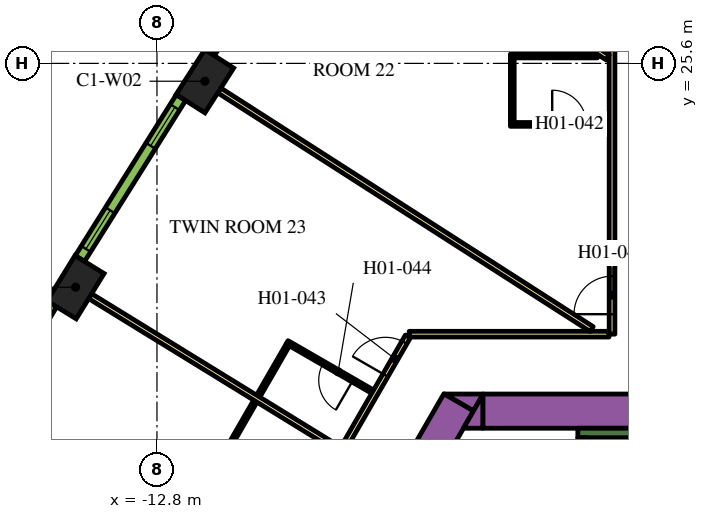
"""IFC4 building model, lengths in metres.
Left out: names, types, materials, properties, quantities, classifications, styles, units other than length and angle.
Written with IfcOpenShell. Run it as: python <this file> out.ifc"""

import sys

from ifc_helpers import new_model, si_unit, direction, frame, frame_2d, origin, origin_2d, place, context, subcontext, project, spatial, polyline, rectangle, outline, extrude, element, fill, save


model = new_model("IFC4")
c1 = context("Model", 3, precision=1e-05, world=origin(), true_north=direction((0.0, 1.0)))
c2 = subcontext(c1, "Body", "Model", "MODEL_VIEW")
j1 = project(units=[si_unit("LENGTHUNIT", "METRE"), si_unit("PLANEANGLEUNIT", "RADIAN")], contexts=[c1])
p1 = place(None, origin())
s1 = spatial("IfcSite", under=j1, at=p1, CompositionType="ELEMENT")
p2 = place(p1, origin())
s2 = spatial("IfcBuilding", under=s1, at=p2, CompositionType="ELEMENT")
p3 = place(p2, frame((0.0, 0.0, 27.6)))
s3 = spatial("IfcBuildingStorey", under=s2, at=p3, CompositionType="ELEMENT", Elevation=27.6)
for number, where, z_axis, x_axis in (
    (1, (-11.539, 25.131, 0.0), (0.0, 0.0, 1.0), (-0.539, -0.842, 0.0)),
    (2, (-14.942, 19.71, 0.0), (0.0, 0.0, 1.0), (-0.524, -0.852, 0.0)),
):
    element("IfcColumn", number, at=place(p3, frame(where, z_axis=z_axis, x_axis=x_axis)), inside=s3, PredefinedType="COLUMN", context=c2, shape_type="SweptSolid", body=[
        extrude(rectangle(XDim=1.4, YDim=0.9, at=origin_2d()), origin(), (0.0, 0.0, 1.0), 3.9),
    ])
p4 = place(p3, frame((-15.36, -1.503, 0.0), z_axis=(0.0, 0.0, 1.0), x_axis=(0.50000389221, 0.866023156604, 0.0)))
e3 = element("IfcWall", 3, at=p4, inside=s3, PredefinedType="SOLIDWALL", context=c2, shape_type="SweptSolid", body=[
    extrude(rectangle(XDim=21.0, YDim=0.9, at=frame_2d((10.5, 0.0))), origin(), (0.0, 0.0, 1.0), 3.9),
])
p5 = place(p3, origin())
e4 = element("IfcWall", 4, at=p5, inside=s3, PredefinedType="SOLIDWALL", context=c2, shape_type="SweptSolid", body=[
    extrude(outline(polyline([(-4.215, 16.9), (-4.469, 16.46), (-5.231, 16.9), (-4.215, 16.9)])), origin(), (0.0, 0.0, 1.0), 3.9),
])
p6 = place(p3, frame((-4.224, 16.45, 0.0), z_axis=(0.0, 0.0, 1.0), x_axis=(1.0, 0.0, 0.0)))
e5 = element("IfcWall", 5, at=p6, inside=s3, PredefinedType="SOLIDWALL", context=c2, shape_type="SweptSolid", body=[
    extrude(rectangle(XDim=9.488, YDim=0.9, at=frame_2d((4.744, 0.0))), origin(), (0.0, 0.0, 1.0), 3.9),
])
e6 = element("IfcWall", 6, at=p5, inside=s3, PredefinedType="SOLIDWALL", context=c2, shape_type="SweptSolid", body=[
    extrude(outline(polyline([(-4.734, 16.0), (-4.226, 16.88), (-4.226, 16.0), (-4.734, 16.0)])), origin(), (0.0, 0.0, 1.0), 3.9),
])
p7 = place(p3, frame((-1.725, 15.875, 0.0), z_axis=(0.0, 0.0, 1.0), x_axis=(1.0, 0.0, 0.0)))
e7 = element("IfcWall", 7, at=p7, inside=s3, PredefinedType="SOLIDWALL", context=c2, shape_type="SweptSolid", body=[
    extrude(rectangle(XDim=3.45, YDim=0.25, at=frame_2d((1.725, 0.0))), origin(), (0.0, 0.0, 1.0), 3.9),
])
p8 = place(p3, frame((-1.6, 8.7, 0.0), z_axis=(0.0, 0.0, 1.0), x_axis=(0.0, 1.0, 0.0)))
e8 = element("IfcWall", 8, at=p8, inside=s3, PredefinedType="SOLIDWALL", context=c2, shape_type="SweptSolid", body=[
    extrude(rectangle(XDim=7.05, YDim=0.25, at=frame_2d((3.525, 0.0))), origin(), (0.0, 0.0, 1.0), 3.9),
])
p9 = place(p3, frame((-0.825, 18.475, 0.0), z_axis=(0.0, 0.0, 1.0), x_axis=(0.0, 1.0, 0.0)))
e9 = element("IfcWall", 9, at=p9, inside=s3, PredefinedType="PARTITIONING", context=c2, shape_type="SweptSolid", body=[
    extrude(rectangle(XDim=16.224, YDim=0.15, at=frame_2d((8.112, 0.0))), origin(), (0.0, 0.0, 1.0), 2.75),
])
p10 = place(p9, frame((7.949, 0.0, 0.0)))
e10 = element("IfcOpeningElement", 10, at=p10, cuts=e9, PredefinedType="OPENING", context=c2, shape_type="SweptSolid", body=[
    extrude(rectangle(XDim=1.0, YDim=2.1, at=frame_2d((0.5, 1.05))), frame((0.0, 0.085, 0.0), z_axis=(0.0, -1.0, 0.0), x_axis=(1.0, 0.0, 0.0)), (0.0, 0.0, 1.0), 0.17),
])
p11 = place(p9, frame((0.526, 0.0, 0.0)))
e11 = element("IfcOpeningElement", 11, at=p11, cuts=e9, PredefinedType="OPENING", context=c2, shape_type="SweptSolid", body=[
    extrude(rectangle(XDim=1.0, YDim=2.1, at=frame_2d((0.5, 1.05))), frame((0.0, 0.085, 0.0), z_axis=(0.0, -1.0, 0.0), x_axis=(1.0, 0.0, 0.0)), (0.0, 0.0, 1.0), 0.17),
])
p12 = place(p3, frame((-6.163, 18.475, 0.0), z_axis=(0.0, 0.0, 1.0), x_axis=(1.0, 0.0, 0.0)))
e12 = element("IfcWall", 12, at=p12, inside=s3, PredefinedType="PARTITIONING", context=c2, shape_type="SweptSolid", body=[
    extrude(rectangle(XDim=5.258, YDim=0.15, at=frame_2d((2.629, 0.0))), origin(), (0.0, 0.0, 1.0), 2.75),
])
p13 = place(p3, frame((-19.081, -3.9, 0.0), z_axis=(0.0, 0.0, 1.0), x_axis=(0.499998313975, 0.866026377209, 0.0)))
e13 = element("IfcWall", 13, at=p13, inside=s3, PredefinedType="PARTITIONING", context=c2, shape_type="SweptSolid", body=[
    extrude(rectangle(XDim=25.766, YDim=0.15, at=frame_2d((12.883, 0.0))), origin(), (0.0, 0.0, 1.0), 2.75),
])
p14 = place(p13, frame((24.586, 0.0, 0.0)))
e14 = element("IfcOpeningElement", 14, at=p14, cuts=e13, PredefinedType="OPENING", context=c2, shape_type="SweptSolid", body=[
    extrude(rectangle(XDim=1.0, YDim=2.1, at=frame_2d((0.5, 1.05))), frame((0.0, 0.085, 0.0), z_axis=(0.0, -1.0, 0.0), x_axis=(1.0, 0.0, 0.0)), (0.0, 0.0, 1.0), 0.17),
])
p15 = place(p13, frame((16.196, 0.0, 0.0)))
e15 = element("IfcOpeningElement", 15, at=p15, cuts=e13, PredefinedType="OPENING", context=c2, shape_type="SweptSolid", body=[
    extrude(rectangle(XDim=1.0, YDim=2.1, at=frame_2d((0.5, 1.05))), frame((0.0, 0.085, 0.0), z_axis=(0.0, -1.0, 0.0), x_axis=(1.0, 0.0, 0.0)), (0.0, 0.0, 1.0), 0.17),
])
p16 = place(p13, frame((14.789, 0.0, 0.0)))
e16 = element("IfcOpeningElement", 16, at=p16, cuts=e13, PredefinedType="OPENING", context=c2, shape_type="SweptSolid", body=[
    extrude(rectangle(XDim=1.1, YDim=2.1, at=frame_2d((0.55, 1.05))), frame((0.0, 0.085, 0.0), z_axis=(0.0, -1.0, 0.0), x_axis=(1.0, 0.0, 0.0)), (0.0, 0.0, 1.0), 0.17),
])
p17 = place(p13, frame((3.698, 0.0, 0.0)))
e17 = element("IfcOpeningElement", 17, at=p17, cuts=e13, PredefinedType="OPENING", context=c2, shape_type="SweptSolid", body=[
    extrude(rectangle(XDim=1.0, YDim=2.1, at=frame_2d((0.5, 1.05))), frame((0.0, 0.085, 0.0), z_axis=(0.0, -1.0, 0.0), x_axis=(1.0, 0.0, 0.0)), (0.0, 0.0, 1.0), 0.17),
])
p18 = place(p13, frame((1.531, 0.0, 0.0)))
e18 = element("IfcOpeningElement", 18, at=p18, cuts=e13, PredefinedType="OPENING", context=c2, shape_type="SweptSolid", body=[
    extrude(rectangle(XDim=0.9, YDim=2.1, at=frame_2d((0.45, 1.05))), frame((0.0, 0.085, 0.0), z_axis=(0.0, -1.0, 0.0), x_axis=(1.0, 0.0, 0.0)), (0.0, 0.0, 1.0), 0.17),
])
p19 = place(p3, frame((-14.558, 19.475, 0.0), z_axis=(0.0, 0.0, 1.0), x_axis=(0.851829455142, -0.523819223925, 0.0)))
e19 = element("IfcWall", 19, at=p19, inside=s3, PredefinedType="PARTITIONING", context=c2, shape_type="SweptSolid", body=[
    extrude(rectangle(XDim=7.688, YDim=0.15, at=frame_2d((3.844, 0.0))), origin(), (0.0, 0.0, 1.0), 2.75),
])
p20 = place(p3, frame((-11.16, 24.888, 0.0), z_axis=(0.0, 0.0, 1.0), x_axis=(0.84199813156, -0.539480441211, 0.0)))
e20 = element("IfcWall", 20, at=p20, inside=s3, PredefinedType="PARTITIONING", context=c2, shape_type="SweptSolid", body=[
    extrude(rectangle(XDim=11.638, YDim=0.15, at=frame_2d((5.819, 0.0))), origin(), (0.0, 0.0, 1.0), 2.75),
])
p21 = place(p3, frame((-7.662, 30.238, 0.0), z_axis=(0.0, 0.0, 1.0), x_axis=(0.831882886825, -0.554951225431, 0.0)))
e21 = element("IfcWall", 21, at=p21, inside=s3, PredefinedType="PARTITIONING", context=c2, shape_type="SweptSolid", body=[
    extrude(rectangle(XDim=8.079, YDim=0.15, at=frame_2d((4.04, 0.0))), origin(), (0.0, 0.0, 1.0), 2.75),
])
p22 = place(p3, frame((-3.5, 23.995, 0.0), z_axis=(0.0, 0.0, 1.0), x_axis=(1.0, 0.0, 0.0)))
e22 = element("IfcWall", 22, at=p22, inside=s3, PredefinedType="PARTITIONING", context=c2, shape_type="SweptSolid", body=[
    extrude(rectangle(XDim=2.6, YDim=0.1, at=frame_2d((1.3, 0.0))), origin(), (0.0, 0.0, 1.0), 2.75),
])
p23 = place(p22, frame((1.1, 0.0, 0.0)))
e23 = element("IfcOpeningElement", 23, at=p23, cuts=e22, PredefinedType="OPENING", context=c2, shape_type="SweptSolid", body=[
    extrude(rectangle(XDim=0.9, YDim=2.1, at=frame_2d((0.45, 1.05))), frame((0.0, 0.06, 0.0), z_axis=(0.0, -1.0, 0.0), x_axis=(1.0, 0.0, 0.0)), (0.0, 0.0, 1.0), 0.12),
])
p24 = place(p3, frame((-3.45, 24.045, 0.0), z_axis=(0.0, 0.0, 1.0), x_axis=(0.0, 1.0, 0.0)))
e24 = element("IfcWall", 24, at=p24, inside=s3, PredefinedType="PARTITIONING", context=c2, shape_type="SweptSolid", body=[
    extrude(rectangle(XDim=1.7, YDim=0.1, at=frame_2d((0.85, 0.0))), origin(), (0.0, 0.0, 1.0), 2.75),
])
p25 = place(p3, frame((-1.21, 25.795, 0.0), z_axis=(0.0, 0.0, 1.0), x_axis=(-1.0, 0.0, 0.0)))
e25 = element("IfcWall", 25, at=p25, inside=s3, PredefinedType="PARTITIONING", context=c2, shape_type="SweptSolid", body=[
    extrude(rectangle(XDim=2.29, YDim=0.1, at=frame_2d((1.145, 0.0))), origin(), (0.0, 0.0, 1.0), 2.75),
])
p26 = place(p3, frame((-7.124, 16.961, 0.0), z_axis=(0.0, 0.0, 1.0), x_axis=(-0.866021400173, 0.500006934395, 0.0)))
e26 = element("IfcWall", 26, at=p26, inside=s3, PredefinedType="PARTITIONING", context=c2, shape_type="SweptSolid", body=[
    extrude(rectangle(XDim=2.6, YDim=0.1, at=frame_2d((1.3, 0.0))), origin(), (0.0, 0.0, 1.0), 2.75),
])
p27 = place(p26, frame((0.6, 0.0, 0.0)))
e27 = element("IfcOpeningElement", 27, at=p27, cuts=e26, PredefinedType="OPENING", context=c2, shape_type="SweptSolid", body=[
    extrude(rectangle(XDim=0.9, YDim=2.1, at=frame_2d((0.45, 1.05))), frame((0.0, 0.06, 0.0), z_axis=(0.0, -1.0, 0.0), x_axis=(1.0, 0.0, 0.0)), (0.0, 0.0, 1.0), 0.12),
])
p28 = place(p3, frame((-9.362, 18.184, 0.0), z_axis=(0.0, 0.0, 1.0), x_axis=(-0.499992328818, -0.866029832698, 0.0)))
e28 = element("IfcWall", 28, at=p28, inside=s3, PredefinedType="PARTITIONING", context=c2, shape_type="SweptSolid", body=[
    extrude(rectangle(XDim=1.54, YDim=0.1, at=frame_2d((0.77, 0.0))), origin(), (0.0, 0.0, 1.0), 2.75),
])
p29 = place(p3, frame((-11.061, 15.242, 0.0), z_axis=(0.0, 0.0, 1.0), x_axis=(0.499976720371, 0.866038843867, 0.0)))
e29 = element("IfcWall", 29, at=p29, inside=s3, PredefinedType="PARTITIONING", context=c2, shape_type="SweptSolid", body=[
    extrude(rectangle(XDim=1.69, YDim=0.1, at=frame_2d((0.845, 0.0))), origin(), (0.0, 0.0, 1.0), 2.75),
])
p30 = place(p3, frame((-8.676, 30.068, 0.0), z_axis=(0.0, 0.0, 1.0), x_axis=(-0.547204617628, -0.836998868845, 0.0)))
e30 = element("IfcWall", 30, at=p30, inside=s3, PredefinedType="SOLIDWALL", context=c2, shape_type="SweptSolid", body=[
    extrude(rectangle(XDim=4.998, YDim=0.29, at=frame_2d((2.499, 0.0))), origin(), (0.0, 0.0, 1.0), 3.65),
])
p31 = place(p30, frame((0.297, 0.0, 0.9)))
e31 = element("IfcOpeningElement", 31, at=p31, cuts=e30, PredefinedType="OPENING", context=c2, shape_type="SweptSolid", body=[
    extrude(rectangle(XDim=1.2, YDim=2.15, at=frame_2d((0.6, 1.075))), frame((0.0, 0.155, 0.0), z_axis=(0.0, -1.0, 0.0), x_axis=(1.0, 0.0, 0.0)), (0.0, 0.0, 1.0), 0.31),
])
p32 = place(p30, frame((3.501, 0.0, 0.9)))
e32 = element("IfcOpeningElement", 32, at=p32, cuts=e30, PredefinedType="OPENING", context=c2, shape_type="SweptSolid", body=[
    extrude(rectangle(XDim=1.2, YDim=2.15, at=frame_2d((0.6, 1.075))), frame((0.0, 0.155, 0.0), z_axis=(0.0, -1.0, 0.0), x_axis=(1.0, 0.0, 0.0)), (0.0, 0.0, 1.0), 0.31),
])
p33 = place(p3, frame((-12.17, 24.699, 0.0), z_axis=(0.0, 0.0, 1.0), x_axis=(-0.531688286542, -0.846940119462, 0.0)))
e33 = element("IfcWall", 33, at=p33, inside=s3, PredefinedType="SOLIDWALL", context=c2, shape_type="SweptSolid", body=[
    extrude(rectangle(XDim=4.998, YDim=0.29, at=frame_2d((2.499, 0.0))), origin(), (0.0, 0.0, 1.0), 3.65),
])
p34 = place(p33, frame((0.297, 0.0, 0.9)))
e34 = element("IfcOpeningElement", 34, at=p34, cuts=e33, PredefinedType="OPENING", context=c2, shape_type="SweptSolid", body=[
    extrude(rectangle(XDim=1.2, YDim=2.15, at=frame_2d((0.6, 1.075))), frame((0.0, 0.155, 0.0), z_axis=(0.0, -1.0, 0.0), x_axis=(1.0, 0.0, 0.0)), (0.0, 0.0, 1.0), 0.31),
])
p35 = place(p33, frame((3.501, 0.0, 0.9)))
e35 = element("IfcOpeningElement", 35, at=p35, cuts=e33, PredefinedType="OPENING", context=c2, shape_type="SweptSolid", body=[
    extrude(rectangle(XDim=1.2, YDim=2.15, at=frame_2d((0.6, 1.075))), frame((0.0, 0.155, 0.0), z_axis=(0.0, -1.0, 0.0), x_axis=(1.0, 0.0, 0.0)), (0.0, 0.0, 1.0), 0.31),
])
p36 = place(p3, frame((-15.564, 19.267, 0.0), z_axis=(0.0, 0.0, 1.0), x_axis=(-0.515938796285, -0.856625448191, 0.0)))
e36 = element("IfcWall", 36, at=p36, inside=s3, PredefinedType="SOLIDWALL", context=c2, shape_type="SweptSolid", body=[
    extrude(rectangle(XDim=4.998, YDim=0.29, at=frame_2d((2.499, 0.0))), origin(), (0.0, 0.0, 1.0), 3.65),
])
p37 = place(p36, frame((0.297, 0.0, 0.9)))
e37 = element("IfcOpeningElement", 37, at=p37, cuts=e36, PredefinedType="OPENING", context=c2, shape_type="SweptSolid", body=[
    extrude(rectangle(XDim=1.2, YDim=2.15, at=frame_2d((0.6, 1.075))), frame((0.0, 0.155, 0.0), z_axis=(0.0, -1.0, 0.0), x_axis=(1.0, 0.0, 0.0)), (0.0, 0.0, 1.0), 0.31),
])
p38 = place(p36, frame((3.501, 0.0, 0.9)))
e38 = element("IfcOpeningElement", 38, at=p38, cuts=e36, PredefinedType="OPENING", context=c2, shape_type="SweptSolid", body=[
    extrude(rectangle(XDim=1.2, YDim=2.15, at=frame_2d((0.6, 1.075))), frame((0.0, 0.155, 0.0), z_axis=(0.0, -1.0, 0.0), x_axis=(1.0, 0.0, 0.0)), (0.0, 0.0, 1.0), 0.31),
])
p39 = place(p11, origin())
e39 = element("IfcDoor", 39, at=p39, inside=s3, OperationType="SINGLE_SWING_LEFT", PredefinedType="DOOR", context=c2, shape_type="SweptSolid", body=[
    extrude(rectangle(XDim=1.0, YDim=2.1, at=frame_2d((0.5, 1.05))), frame((0.0, 0.025, 0.0), z_axis=(0.0, -1.0, 0.0), x_axis=(1.0, 0.0, 0.0)), (0.0, 0.0, 1.0), 0.05),
])
fill(e11, e39)
p40 = place(p23, origin())
e40 = element("IfcDoor", 40, at=p40, inside=s3, OperationType="SINGLE_SWING_LEFT", PredefinedType="DOOR", context=c2, shape_type="SweptSolid", body=[
    extrude(rectangle(XDim=0.9, YDim=2.1, at=frame_2d((0.45, 1.05))), frame((0.0, 0.025, 0.0), z_axis=(0.0, -1.0, 0.0), x_axis=(1.0, 0.0, 0.0)), (0.0, 0.0, 1.0), 0.05),
])
fill(e23, e40)
p41 = place(p14, origin())
e41 = element("IfcDoor", 41, at=p41, inside=s3, OperationType="SINGLE_SWING_RIGHT", PredefinedType="DOOR", context=c2, shape_type="SweptSolid", body=[
    extrude(rectangle(XDim=1.0, YDim=2.1, at=frame_2d((0.5, 1.05))), frame((0.0, 0.025, 0.0), z_axis=(0.0, -1.0, 0.0), x_axis=(1.0, 0.0, 0.0)), (0.0, 0.0, 1.0), 0.05),
])
fill(e14, e41)
p42 = place(p27, origin())
e42 = element("IfcDoor", 42, at=p42, inside=s3, OperationType="SINGLE_SWING_LEFT", PredefinedType="DOOR", context=c2, shape_type="SweptSolid", body=[
    extrude(rectangle(XDim=0.9, YDim=2.1, at=frame_2d((0.45, 1.05))), frame((0.0, 0.025, 0.0), z_axis=(0.0, -1.0, 0.0), x_axis=(1.0, 0.0, 0.0)), (0.0, 0.0, 1.0), 0.05),
])
fill(e27, e42)
p43 = place(p34, origin())
e43 = element("IfcWindow", 43, at=p43, inside=s3, PartitioningType="DOUBLE_PANEL_VERTICAL", PredefinedType="WINDOW", context=c2, shape_type="SweptSolid", body=[
    extrude(rectangle(XDim=1.2, YDim=2.15, at=frame_2d((0.6, 1.075))), frame((0.0, 0.015, 0.0), z_axis=(0.0, -1.0, 0.0), x_axis=(1.0, 0.0, 0.0)), (0.0, 0.0, 1.0), 0.06),
])
fill(e34, e43)
p44 = place(p35, origin())
e44 = element("IfcWindow", 44, at=p44, inside=s3, PartitioningType="DOUBLE_PANEL_VERTICAL", PredefinedType="WINDOW", context=c2, shape_type="SweptSolid", body=[
    extrude(rectangle(XDim=1.2, YDim=2.15, at=frame_2d((0.6, 1.075))), frame((0.0, 0.015, 0.0), z_axis=(0.0, -1.0, 0.0), x_axis=(1.0, 0.0, 0.0)), (0.0, 0.0, 1.0), 0.06),
])
fill(e35, e44)
save(model, sys.argv[1])
